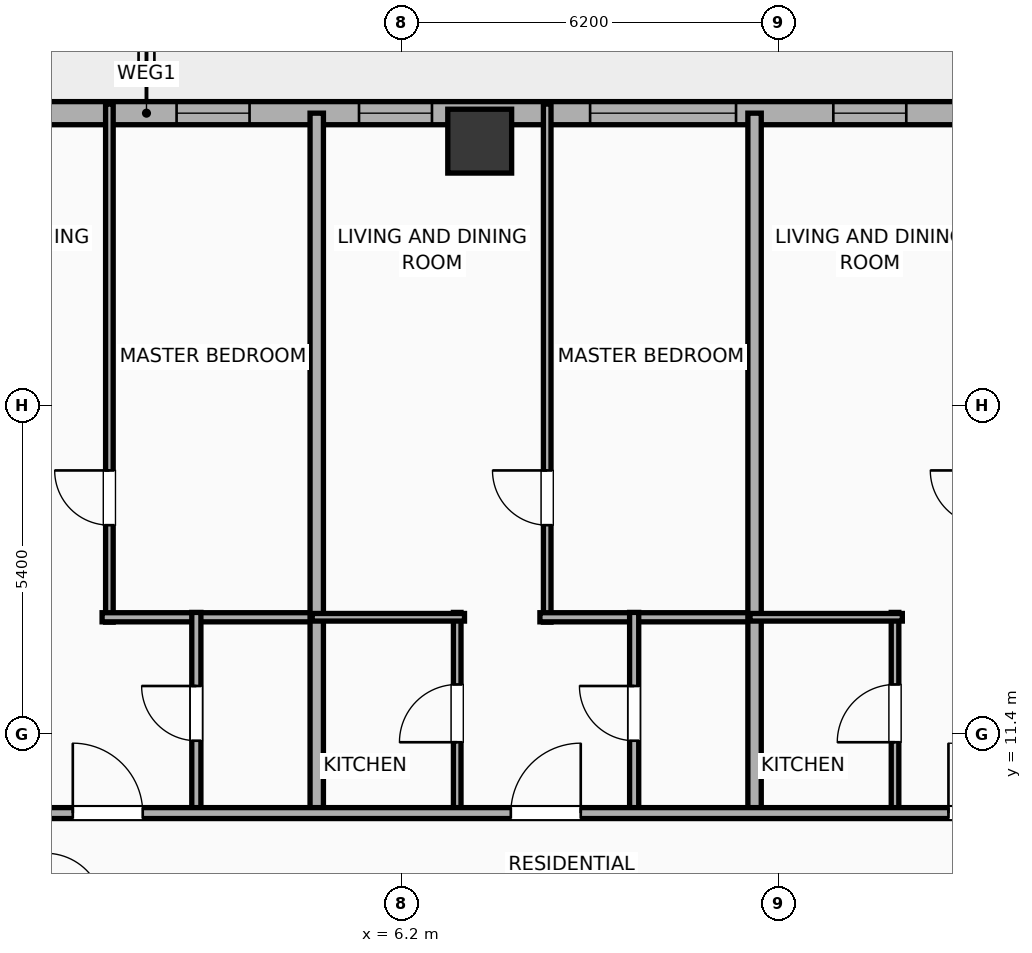
"""IFC4 building model, lengths in metres.
Left out: names, types, materials, properties, quantities, classifications, styles, units other than length and angle.
Written with IfcOpenShell. Run it as: python <this file> out.ifc"""

import sys

from ifc_helpers import new_model, si_unit, direction, frame, frame_2d, origin, origin_2d, place, context, subcontext, project, spatial, rectangle, hollow_rectangle, extrude, element, fill, save


model = new_model("IFC4")
c1 = context("Model", 3, precision=1e-05, world=origin(), true_north=direction((0.0, 1.0)))
c2 = subcontext(c1, "Body", "Model", "MODEL_VIEW")
j1 = project(units=[si_unit("LENGTHUNIT", "METRE"), si_unit("PLANEANGLEUNIT", "RADIAN")], contexts=[c1])
p1 = place(None, origin())
s1 = spatial("IfcSite", under=j1, at=p1, CompositionType="ELEMENT")
p2 = place(p1, origin())
s2 = spatial("IfcBuilding", under=s1, at=p2, CompositionType="ELEMENT")
p3 = place(p2, frame((0.0, 0.0, 113.1)))
s3 = spatial("IfcBuildingStorey", under=s2, at=p3, CompositionType="ELEMENT", Elevation=113.1)
p4 = place(p3, frame((7.48, 21.15, 0.0), z_axis=(0.0, 0.0, 1.0), x_axis=(1.0, 0.0, 0.0)))
e1 = element("IfcColumn", 1, at=p4, inside=s3, PredefinedType="COLUMN", context=c2, shape_type="SweptSolid", body=[
    extrude(hollow_rectangle(XDim=1.05, YDim=1.05, WallThickness=0.036, at=origin_2d()), origin(), (0.0, 0.0, 1.0), 3.9),
])
p5 = place(p3, frame((-25.381, 21.61, 0.0), z_axis=(0.0, 0.0, 1.0), x_axis=(1.0, 0.0, 0.0)))
e2 = element("IfcWall", 2, at=p5, inside=s3, PredefinedType="ELEMENTEDWALL", context=c2, shape_type="SweptSolid", body=[
    extrude(rectangle(XDim=54.763, YDim=0.38, at=frame_2d((27.381, 0.0))), origin(), (0.0, 0.0, 1.0), 3.65),
])
p6 = place(p5, frame((5.645, 0.0, 0.75)))
e3 = element("IfcOpeningElement", 3, at=p6, cuts=e2, PredefinedType="OPENING", context=c2, shape_type="SweptSolid", body=[
    extrude(rectangle(XDim=2.4, YDim=2.1, at=frame_2d((1.2, 1.05))), frame((0.0, 0.2, 0.0), z_axis=(0.0, -1.0, 0.0), x_axis=(1.0, 0.0, 0.0)), (0.0, 0.0, 1.0), 0.4),
])
p7 = place(p5, frame((34.677, 0.0, 0.75)))
e4 = element("IfcOpeningElement", 4, at=p7, cuts=e2, PredefinedType="OPENING", context=c2, shape_type="SweptSolid", body=[
    extrude(rectangle(XDim=2.4, YDim=2.1, at=frame_2d((1.2, 1.05))), frame((0.0, 0.2, 0.0), z_axis=(0.0, -1.0, 0.0), x_axis=(1.0, 0.0, 0.0)), (0.0, 0.0, 1.0), 0.4),
])
p8 = place(p5, frame((45.067, 0.0, 0.75)))
e5 = element("IfcOpeningElement", 5, at=p8, cuts=e2, PredefinedType="OPENING", context=c2, shape_type="SweptSolid", body=[
    extrude(rectangle(XDim=2.4, YDim=2.1, at=frame_2d((1.2, 1.05))), frame((0.0, 0.2, 0.0), z_axis=(0.0, -1.0, 0.0), x_axis=(1.0, 0.0, 0.0)), (0.0, 0.0, 1.0), 0.4),
])
p9 = place(p5, frame((2.938, 0.0, 0.75)))
e6 = element("IfcOpeningElement", 6, at=p9, cuts=e2, PredefinedType="OPENING", context=c2, shape_type="SweptSolid", body=[
    extrude(rectangle(XDim=1.2, YDim=2.05, at=frame_2d((0.6, 1.025))), frame((0.0, 0.2, 0.0), z_axis=(0.0, -1.0, 0.0), x_axis=(1.0, 0.0, 0.0)), (0.0, 0.0, 1.0), 0.4),
])
p10 = place(p5, frame((8.916, 0.0, 0.75)))
e7 = element("IfcOpeningElement", 7, at=p10, cuts=e2, PredefinedType="OPENING", context=c2, shape_type="SweptSolid", body=[
    extrude(rectangle(XDim=1.2, YDim=2.05, at=frame_2d((0.6, 1.025))), frame((0.0, 0.2, 0.0), z_axis=(0.0, -1.0, 0.0), x_axis=(1.0, 0.0, 0.0)), (0.0, 0.0, 1.0), 0.4),
])
p11 = place(p5, frame((13.476, 0.0, 0.75)))
e8 = element("IfcOpeningElement", 8, at=p11, cuts=e2, PredefinedType="OPENING", context=c2, shape_type="SweptSolid", body=[
    extrude(rectangle(XDim=1.2, YDim=2.05, at=frame_2d((0.6, 1.025))), frame((0.0, 0.2, 0.0), z_axis=(0.0, -1.0, 0.0), x_axis=(1.0, 0.0, 0.0)), (0.0, 0.0, 1.0), 0.4),
])
p12 = place(p5, frame((17.076, 0.0, 0.75)))
e9 = element("IfcOpeningElement", 9, at=p12, cuts=e2, PredefinedType="OPENING", context=c2, shape_type="SweptSolid", body=[
    extrude(rectangle(XDim=1.2, YDim=2.05, at=frame_2d((0.6, 1.025))), frame((0.0, 0.2, 0.0), z_axis=(0.0, -1.0, 0.0), x_axis=(1.0, 0.0, 0.0)), (0.0, 0.0, 1.0), 0.4),
])
p13 = place(p5, frame((19.956, 0.0, 0.75)))
e10 = element("IfcOpeningElement", 10, at=p13, cuts=e2, PredefinedType="OPENING", context=c2, shape_type="SweptSolid", body=[
    extrude(rectangle(XDim=1.2, YDim=2.05, at=frame_2d((0.6, 1.025))), frame((0.0, 0.2, 0.0), z_axis=(0.0, -1.0, 0.0), x_axis=(1.0, 0.0, 0.0)), (0.0, 0.0, 1.0), 0.4),
])
p14 = place(p5, frame((24.276, 0.0, 0.75)))
e11 = element("IfcOpeningElement", 11, at=p14, cuts=e2, PredefinedType="OPENING", context=c2, shape_type="SweptSolid", body=[
    extrude(rectangle(XDim=1.2, YDim=2.05, at=frame_2d((0.6, 1.025))), frame((0.0, 0.2, 0.0), z_axis=(0.0, -1.0, 0.0), x_axis=(1.0, 0.0, 0.0)), (0.0, 0.0, 1.0), 0.4),
])
p15 = place(p5, frame((27.876, 0.0, 0.75)))
e12 = element("IfcOpeningElement", 12, at=p15, cuts=e2, PredefinedType="OPENING", context=c2, shape_type="SweptSolid", body=[
    extrude(rectangle(XDim=1.2, YDim=2.05, at=frame_2d((0.6, 1.025))), frame((0.0, 0.2, 0.0), z_axis=(0.0, -1.0, 0.0), x_axis=(1.0, 0.0, 0.0)), (0.0, 0.0, 1.0), 0.4),
])
p16 = place(p5, frame((30.876, 0.0, 0.75)))
e13 = element("IfcOpeningElement", 13, at=p16, cuts=e2, PredefinedType="OPENING", context=c2, shape_type="SweptSolid", body=[
    extrude(rectangle(XDim=1.2, YDim=2.05, at=frame_2d((0.6, 1.025))), frame((0.0, 0.2, 0.0), z_axis=(0.0, -1.0, 0.0), x_axis=(1.0, 0.0, 0.0)), (0.0, 0.0, 1.0), 0.4),
])
p17 = place(p5, frame((38.676, 0.0, 0.75)))
e14 = element("IfcOpeningElement", 14, at=p17, cuts=e2, PredefinedType="OPENING", context=c2, shape_type="SweptSolid", body=[
    extrude(rectangle(XDim=1.2, YDim=2.05, at=frame_2d((0.6, 1.025))), frame((0.0, 0.2, 0.0), z_axis=(0.0, -1.0, 0.0), x_axis=(1.0, 0.0, 0.0)), (0.0, 0.0, 1.0), 0.4),
])
p18 = place(p5, frame((41.796, 0.0, 0.75)))
e15 = element("IfcOpeningElement", 15, at=p18, cuts=e2, PredefinedType="OPENING", context=c2, shape_type="SweptSolid", body=[
    extrude(rectangle(XDim=1.2, YDim=2.05, at=frame_2d((0.6, 1.025))), frame((0.0, 0.2, 0.0), z_axis=(0.0, -1.0, 0.0), x_axis=(1.0, 0.0, 0.0)), (0.0, 0.0, 1.0), 0.4),
])
p19 = place(p5, frame((49.476, 0.0, 0.75)))
e16 = element("IfcOpeningElement", 16, at=p19, cuts=e2, PredefinedType="OPENING", context=c2, shape_type="SweptSolid", body=[
    extrude(rectangle(XDim=1.2, YDim=2.05, at=frame_2d((0.6, 1.025))), frame((0.0, 0.2, 0.0), z_axis=(0.0, -1.0, 0.0), x_axis=(1.0, 0.0, 0.0)), (0.0, 0.0, 1.0), 0.4),
])
p20 = place(p5, frame((52.227, 0.0, 0.75)))
e17 = element("IfcOpeningElement", 17, at=p20, cuts=e2, PredefinedType="OPENING", context=c2, shape_type="SweptSolid", body=[
    extrude(rectangle(XDim=1.2, YDim=2.05, at=frame_2d((0.6, 1.025))), frame((0.0, 0.2, 0.0), z_axis=(0.0, -1.0, 0.0), x_axis=(1.0, 0.0, 0.0)), (0.0, 0.0, 1.0), 0.4),
])
p21 = place(p3, frame((1.39, 13.24, 0.0), z_axis=(0.0, 0.0, 1.0), x_axis=(0.0, 1.0, 0.0)))
e18 = element("IfcWall", 18, at=p21, inside=s3, PredefinedType="PARTITIONING", context=c2, shape_type="SweptSolid", body=[
    extrude(rectangle(XDim=8.52, YDim=0.125, at=frame_2d((4.26, 0.0))), origin(), (0.0, 0.0, 1.0), 3.65),
])
p22 = place(p21, frame((1.595, 0.0, 0.0)))
e19 = element("IfcOpeningElement", 19, at=p22, cuts=e18, PredefinedType="OPENING", context=c2, shape_type="SweptSolid", body=[
    extrude(rectangle(XDim=0.9, YDim=2.05, at=frame_2d((0.45, 1.025))), frame((0.0, 0.073, 0.0), z_axis=(0.0, -1.0, 0.0), x_axis=(1.0, 0.0, 0.0)), (0.0, 0.0, 1.0), 0.145),
])
p23 = place(p3, frame((1.27, 13.32, 0.0), z_axis=(0.0, 0.0, 1.0), x_axis=(1.0, 0.0, 0.0)))
e20 = element("IfcWall", 20, at=p23, inside=s3, PredefinedType="PLUMBINGWALL", context=c2, shape_type="SweptSolid", body=[
    extrude(rectangle(XDim=3.605, YDim=0.15, at=frame_2d((1.802, 0.0))), origin(), (0.0, 0.0, 1.0), 3.65),
])
p24 = place(p3, frame((2.82, 10.08, 0.0), z_axis=(0.0, 0.0, 1.0), x_axis=(0.0, 1.0, 0.0)))
e21 = element("IfcWall", 21, at=p24, inside=s3, PredefinedType="PLUMBINGWALL", context=c2, shape_type="SweptSolid", body=[
    extrude(rectangle(XDim=3.32, YDim=0.15, at=frame_2d((1.66, 0.0))), origin(), (0.0, 0.0, 1.0), 3.65),
])
p25 = place(p24, frame((1.21, 0.0, 0.0)))
e22 = element("IfcOpeningElement", 22, at=p25, cuts=e21, PredefinedType="OPENING", context=c2, shape_type="SweptSolid", body=[
    extrude(rectangle(XDim=0.9, YDim=2.05, at=frame_2d((0.45, 1.025))), frame((0.0, 0.085, 0.0), z_axis=(0.0, -1.0, 0.0), x_axis=(1.0, 0.0, 0.0)), (0.0, 0.0, 1.0), 0.17),
])
p26 = place(p3, frame((4.8, 10.02, 0.0), z_axis=(0.0, 0.0, 1.0), x_axis=(0.0, 1.0, 0.0)))
e23 = element("IfcWall", 23, at=p26, inside=s3, PredefinedType="PARTITIONING", context=c2, shape_type="SweptSolid", body=[
    extrude(rectangle(XDim=11.59, YDim=0.22, at=frame_2d((5.795, 0.0))), origin(), (0.0, 0.0, 1.0), 3.04),
])
p27 = place(p3, frame((8.59, 13.24, 0.0), z_axis=(0.0, 0.0, 1.0), x_axis=(0.0, 1.0, 0.0)))
e24 = element("IfcWall", 24, at=p27, inside=s3, PredefinedType="PARTITIONING", context=c2, shape_type="SweptSolid", body=[
    extrude(rectangle(XDim=8.52, YDim=0.125, at=frame_2d((4.26, 0.0))), origin(), (0.0, 0.0, 1.0), 3.65),
])
p28 = place(p27, frame((1.595, 0.0, 0.0)))
e25 = element("IfcOpeningElement", 25, at=p28, cuts=e24, PredefinedType="OPENING", context=c2, shape_type="SweptSolid", body=[
    extrude(rectangle(XDim=0.9, YDim=2.05, at=frame_2d((0.45, 1.025))), frame((0.0, 0.073, 0.0), z_axis=(0.0, -1.0, 0.0), x_axis=(1.0, 0.0, 0.0)), (0.0, 0.0, 1.0), 0.145),
])
p29 = place(p3, frame((8.47, 13.32, 0.0), z_axis=(0.0, 0.0, 1.0), x_axis=(1.0, 0.0, 0.0)))
e26 = element("IfcWall", 26, at=p29, inside=s3, PredefinedType="PLUMBINGWALL", context=c2, shape_type="SweptSolid", body=[
    extrude(rectangle(XDim=3.605, YDim=0.15, at=frame_2d((1.802, 0.0))), origin(), (0.0, 0.0, 1.0), 3.65),
])
p30 = place(p3, frame((7.11, 10.08, 0.0), z_axis=(0.0, 0.0, 1.0), x_axis=(0.0, 1.0, 0.0)))
e27 = element("IfcWall", 27, at=p30, inside=s3, PredefinedType="PARTITIONING", context=c2, shape_type="SweptSolid", body=[
    extrude(rectangle(XDim=3.32, YDim=0.125, at=frame_2d((1.66, 0.0))), origin(), (0.0, 0.0, 1.0), 3.65),
])
p31 = place(p30, frame((1.185, 0.0, 0.0)))
e28 = element("IfcOpeningElement", 28, at=p31, cuts=e27, PredefinedType="OPENING", context=c2, shape_type="SweptSolid", body=[
    extrude(rectangle(XDim=0.95, YDim=2.05, at=frame_2d((0.475, 1.025))), frame((0.0, 0.073, 0.0), z_axis=(0.0, -1.0, 0.0), x_axis=(1.0, 0.0, 0.0)), (0.0, 0.0, 1.0), 0.145),
])
p32 = place(p3, frame((4.725, 13.32, 0.0), z_axis=(0.0, 0.0, 1.0), x_axis=(1.0, 0.0, 0.0)))
e29 = element("IfcWall", 29, at=p32, inside=s3, PredefinedType="PARTITIONING", context=c2, shape_type="SweptSolid", body=[
    extrude(rectangle(XDim=2.505, YDim=0.125, at=frame_2d((1.252, 0.0))), origin(), (0.0, 0.0, 1.0), 3.65),
])
p33 = place(p3, frame((10.02, 10.08, 0.0), z_axis=(0.0, 0.0, 1.0), x_axis=(0.0, 1.0, 0.0)))
e30 = element("IfcWall", 30, at=p33, inside=s3, PredefinedType="PLUMBINGWALL", context=c2, shape_type="SweptSolid", body=[
    extrude(rectangle(XDim=3.32, YDim=0.15, at=frame_2d((1.66, 0.0))), origin(), (0.0, 0.0, 1.0), 3.65),
])
p34 = place(p33, frame((1.21, 0.0, 0.0)))
e31 = element("IfcOpeningElement", 31, at=p34, cuts=e30, PredefinedType="OPENING", context=c2, shape_type="SweptSolid", body=[
    extrude(rectangle(XDim=0.9, YDim=2.05, at=frame_2d((0.45, 1.025))), frame((0.0, 0.085, 0.0), z_axis=(0.0, -1.0, 0.0), x_axis=(1.0, 0.0, 0.0)), (0.0, 0.0, 1.0), 0.17),
])
p35 = place(p3, frame((12.0, 10.02, 0.0), z_axis=(0.0, 0.0, 1.0), x_axis=(0.0, 1.0, 0.0)))
e32 = element("IfcWall", 32, at=p35, inside=s3, PredefinedType="PARTITIONING", context=c2, shape_type="SweptSolid", body=[
    extrude(rectangle(XDim=11.59, YDim=0.22, at=frame_2d((5.795, 0.0))), origin(), (0.0, 0.0, 1.0), 3.65),
])
p36 = place(p3, frame((14.31, 10.08, 0.0), z_axis=(0.0, 0.0, 1.0), x_axis=(0.0, 1.0, 0.0)))
e33 = element("IfcWall", 33, at=p36, inside=s3, PredefinedType="PARTITIONING", context=c2, shape_type="SweptSolid", body=[
    extrude(rectangle(XDim=3.32, YDim=0.125, at=frame_2d((1.66, 0.0))), origin(), (0.0, 0.0, 1.0), 3.65),
])
p37 = place(p36, frame((1.185, 0.0, 0.0)))
e34 = element("IfcOpeningElement", 34, at=p37, cuts=e33, PredefinedType="OPENING", context=c2, shape_type="SweptSolid", body=[
    extrude(rectangle(XDim=0.95, YDim=2.05, at=frame_2d((0.475, 1.025))), frame((0.0, 0.073, 0.0), z_axis=(0.0, -1.0, 0.0), x_axis=(1.0, 0.0, 0.0)), (0.0, 0.0, 1.0), 0.145),
])
p38 = place(p3, frame((11.925, 13.32, 0.0), z_axis=(0.0, 0.0, 1.0), x_axis=(1.0, 0.0, 0.0)))
e35 = element("IfcWall", 35, at=p38, inside=s3, PredefinedType="PARTITIONING", context=c2, shape_type="SweptSolid", body=[
    extrude(rectangle(XDim=2.505, YDim=0.125, at=frame_2d((1.252, 0.0))), origin(), (0.0, 0.0, 1.0), 3.65),
])
p39 = place(p3, frame((-29.21, 10.1, 0.0), z_axis=(0.0, 0.0, 1.0), x_axis=(1.0, 0.0, 0.0)))
e36 = element("IfcWall", 36, at=p39, inside=s3, PredefinedType="PARTITIONING", context=c2, shape_type="SweptSolid", body=[
    extrude(rectangle(XDim=62.42, YDim=0.18, at=frame_2d((31.21, 0.0))), origin(), (0.0, 0.0, 1.0), 3.65),
])
p40 = place(p39, frame((2.74, 0.0, 0.0)))
e37 = element("IfcOpeningElement", 37, at=p40, cuts=e36, PredefinedType="OPENING", context=c2, shape_type="SweptSolid", body=[
    extrude(rectangle(XDim=0.9, YDim=2.05, at=frame_2d((0.45, 1.025))), frame((0.0, 0.1, 0.0), z_axis=(0.0, -1.0, 0.0), x_axis=(1.0, 0.0, 0.0)), (0.0, 0.0, 1.0), 0.2),
])
p41 = place(p39, frame((9.868, 0.0, 0.0)))
e38 = element("IfcOpeningElement", 38, at=p41, cuts=e36, PredefinedType="OPENING", context=c2, shape_type="SweptSolid", body=[
    extrude(rectangle(XDim=1.15, YDim=2.05, at=frame_2d((0.575, 1.025))), frame((0.0, 0.1, 0.0), z_axis=(0.0, -1.0, 0.0), x_axis=(1.0, 0.0, 0.0)), (0.0, 0.0, 1.0), 0.2),
])
p42 = place(p39, frame((15.598, 0.0, 0.0)))
e39 = element("IfcOpeningElement", 39, at=p42, cuts=e36, PredefinedType="OPENING", context=c2, shape_type="SweptSolid", body=[
    extrude(rectangle(XDim=1.15, YDim=2.05, at=frame_2d((0.575, 1.025))), frame((0.0, 0.1, 0.0), z_axis=(0.0, -1.0, 0.0), x_axis=(1.0, 0.0, 0.0)), (0.0, 0.0, 1.0), 0.2),
])
p43 = place(p39, frame((22.801, 0.0, 0.0)))
e40 = element("IfcOpeningElement", 40, at=p43, cuts=e36, PredefinedType="OPENING", context=c2, shape_type="SweptSolid", body=[
    extrude(rectangle(XDim=1.15, YDim=2.05, at=frame_2d((0.575, 1.025))), frame((0.0, 0.1, 0.0), z_axis=(0.0, -1.0, 0.0), x_axis=(1.0, 0.0, 0.0)), (0.0, 0.0, 1.0), 0.2),
])
p44 = place(p39, frame((29.998, 0.0, 0.0)))
e41 = element("IfcOpeningElement", 41, at=p44, cuts=e36, PredefinedType="OPENING", context=c2, shape_type="SweptSolid", body=[
    extrude(rectangle(XDim=1.15, YDim=2.05, at=frame_2d((0.575, 1.025))), frame((0.0, 0.1, 0.0), z_axis=(0.0, -1.0, 0.0), x_axis=(1.0, 0.0, 0.0)), (0.0, 0.0, 1.0), 0.2),
])
p45 = place(p39, frame((37.202, 0.0, 0.0)))
e42 = element("IfcOpeningElement", 42, at=p45, cuts=e36, PredefinedType="OPENING", context=c2, shape_type="SweptSolid", body=[
    extrude(rectangle(XDim=1.15, YDim=2.05, at=frame_2d((0.575, 1.025))), frame((0.0, 0.1, 0.0), z_axis=(0.0, -1.0, 0.0), x_axis=(1.0, 0.0, 0.0)), (0.0, 0.0, 1.0), 0.2),
])
p46 = place(p39, frame((44.399, 0.0, 0.0)))
e43 = element("IfcOpeningElement", 43, at=p46, cuts=e36, PredefinedType="OPENING", context=c2, shape_type="SweptSolid", body=[
    extrude(rectangle(XDim=1.15, YDim=2.05, at=frame_2d((0.575, 1.025))), frame((0.0, 0.1, 0.0), z_axis=(0.0, -1.0, 0.0), x_axis=(1.0, 0.0, 0.0)), (0.0, 0.0, 1.0), 0.2),
])
p47 = place(p39, frame((51.602, 0.0, 0.0)))
e44 = element("IfcOpeningElement", 44, at=p47, cuts=e36, PredefinedType="OPENING", context=c2, shape_type="SweptSolid", body=[
    extrude(rectangle(XDim=1.15, YDim=2.05, at=frame_2d((0.575, 1.025))), frame((0.0, 0.1, 0.0), z_axis=(0.0, -1.0, 0.0), x_axis=(1.0, 0.0, 0.0)), (0.0, 0.0, 1.0), 0.2),
])
p48 = place(p39, frame((58.762, 0.0, 0.0)))
e45 = element("IfcOpeningElement", 45, at=p48, cuts=e36, PredefinedType="OPENING", context=c2, shape_type="SweptSolid", body=[
    extrude(rectangle(XDim=0.9, YDim=2.05, at=frame_2d((0.45, 1.025))), frame((0.0, 0.1, 0.0), z_axis=(0.0, -1.0, 0.0), x_axis=(1.0, 0.0, 0.0)), (0.0, 0.0, 1.0), 0.2),
])
p49 = place(p7, origin())
e46 = element("IfcWindow", 46, at=p49, inside=s3, PartitioningType="SINGLE_PANEL", PredefinedType="WINDOW", context=c2, shape_type="SweptSolid", body=[
    extrude(rectangle(XDim=2.4, YDim=2.1, at=frame_2d((1.2, 1.05))), frame((0.0, 0.03, 0.0), z_axis=(0.0, -1.0, 0.0), x_axis=(1.0, 0.0, 0.0)), (0.0, 0.0, 1.0), 0.06),
])
fill(e4, e46)
p50 = place(p15, origin())
e47 = element("IfcWindow", 47, at=p50, inside=s3, PartitioningType="SINGLE_PANEL", PredefinedType="WINDOW", context=c2, shape_type="SweptSolid", body=[
    extrude(rectangle(XDim=1.2, YDim=2.05, at=frame_2d((0.6, 1.025))), frame((0.0, 0.03, 0.0), z_axis=(0.0, -1.0, 0.0), x_axis=(1.0, 0.0, 0.0)), (0.0, 0.0, 1.0), 0.06),
])
fill(e12, e47)
p51 = place(p16, origin())
e48 = element("IfcWindow", 48, at=p51, inside=s3, PartitioningType="SINGLE_PANEL", PredefinedType="WINDOW", context=c2, shape_type="SweptSolid", body=[
    extrude(rectangle(XDim=1.2, YDim=2.05, at=frame_2d((0.6, 1.025))), frame((0.0, 0.03, 0.0), z_axis=(0.0, -1.0, 0.0), x_axis=(1.0, 0.0, 0.0)), (0.0, 0.0, 1.0), 0.06),
])
fill(e13, e48)
p52 = place(p17, origin())
e49 = element("IfcWindow", 49, at=p52, inside=s3, PartitioningType="SINGLE_PANEL", PredefinedType="WINDOW", context=c2, shape_type="SweptSolid", body=[
    extrude(rectangle(XDim=1.2, YDim=2.05, at=frame_2d((0.6, 1.025))), frame((0.0, 0.03, 0.0), z_axis=(0.0, -1.0, 0.0), x_axis=(1.0, 0.0, 0.0)), (0.0, 0.0, 1.0), 0.06),
])
fill(e14, e49)
p53 = place(p22, origin())
e50 = element("IfcDoor", 50, at=p53, inside=s3, OperationType="SINGLE_SWING_RIGHT", PredefinedType="DOOR", context=c2, shape_type="SweptSolid", body=[
    extrude(rectangle(XDim=0.9, YDim=2.05, at=frame_2d((0.45, 1.025))), frame((0.0, 0.025, 0.0), z_axis=(0.0, -1.0, 0.0), x_axis=(1.0, 0.0, 0.0)), (0.0, 0.0, 1.0), 0.05),
])
fill(e19, e50)
p54 = place(p25, origin())
e51 = element("IfcDoor", 51, at=p54, inside=s3, OperationType="SINGLE_SWING_RIGHT", PredefinedType="DOOR", context=c2, shape_type="SweptSolid", body=[
    extrude(rectangle(XDim=0.9, YDim=2.05, at=frame_2d((0.45, 1.025))), frame((0.0, 0.025, 0.0), z_axis=(0.0, -1.0, 0.0), x_axis=(1.0, 0.0, 0.0)), (0.0, 0.0, 1.0), 0.05),
])
fill(e22, e51)
p55 = place(p28, origin())
e52 = element("IfcDoor", 52, at=p55, inside=s3, OperationType="SINGLE_SWING_RIGHT", PredefinedType="DOOR", context=c2, shape_type="SweptSolid", body=[
    extrude(rectangle(XDim=0.9, YDim=2.05, at=frame_2d((0.45, 1.025))), frame((0.0, 0.025, 0.0), z_axis=(0.0, -1.0, 0.0), x_axis=(1.0, 0.0, 0.0)), (0.0, 0.0, 1.0), 0.05),
])
fill(e25, e52)
p56 = place(p31, origin())
e53 = element("IfcDoor", 53, at=p56, inside=s3, OperationType="SINGLE_SWING_LEFT", PredefinedType="DOOR", context=c2, shape_type="SweptSolid", body=[
    extrude(rectangle(XDim=0.95, YDim=2.05, at=frame_2d((0.475, 1.025))), frame((0.0, 0.025, 0.0), z_axis=(0.0, -1.0, 0.0), x_axis=(1.0, 0.0, 0.0)), (0.0, 0.0, 1.0), 0.05),
])
fill(e28, e53)
p57 = place(p34, origin())
e54 = element("IfcDoor", 54, at=p57, inside=s3, OperationType="SINGLE_SWING_RIGHT", PredefinedType="DOOR", context=c2, shape_type="SweptSolid", body=[
    extrude(rectangle(XDim=0.9, YDim=2.05, at=frame_2d((0.45, 1.025))), frame((0.0, 0.025, 0.0), z_axis=(0.0, -1.0, 0.0), x_axis=(1.0, 0.0, 0.0)), (0.0, 0.0, 1.0), 0.05),
])
fill(e31, e54)
p58 = place(p37, origin())
e55 = element("IfcDoor", 55, at=p58, inside=s3, OperationType="SINGLE_SWING_LEFT", PredefinedType="DOOR", context=c2, shape_type="SweptSolid", body=[
    extrude(rectangle(XDim=0.95, YDim=2.05, at=frame_2d((0.475, 1.025))), frame((0.0, 0.025, 0.0), z_axis=(0.0, -1.0, 0.0), x_axis=(1.0, 0.0, 0.0)), (0.0, 0.0, 1.0), 0.05),
])
fill(e34, e55)
p59 = place(p44, origin())
e56 = element("IfcDoor", 56, at=p59, inside=s3, OperationType="SINGLE_SWING_LEFT", PredefinedType="DOOR", context=c2, shape_type="SweptSolid", body=[
    extrude(rectangle(XDim=1.15, YDim=2.05, at=frame_2d((0.575, 1.025))), frame((0.0, 0.025, 0.0), z_axis=(0.0, -1.0, 0.0), x_axis=(1.0, 0.0, 0.0)), (0.0, 0.0, 1.0), 0.05),
])
fill(e41, e56)
p60 = place(p45, origin())
e57 = element("IfcDoor", 57, at=p60, inside=s3, OperationType="SINGLE_SWING_RIGHT", PredefinedType="DOOR", context=c2, shape_type="SweptSolid", body=[
    extrude(rectangle(XDim=1.15, YDim=2.05, at=frame_2d((0.575, 1.025))), frame((0.0, 0.025, 0.0), z_axis=(0.0, -1.0, 0.0), x_axis=(1.0, 0.0, 0.0)), (0.0, 0.0, 1.0), 0.05),
])
fill(e42, e57)
p61 = place(p46, origin())
e58 = element("IfcDoor", 58, at=p61, inside=s3, OperationType="SINGLE_SWING_LEFT", PredefinedType="DOOR", context=c2, shape_type="SweptSolid", body=[
    extrude(rectangle(XDim=1.15, YDim=2.05, at=frame_2d((0.575, 1.025))), frame((0.0, 0.025, 0.0), z_axis=(0.0, -1.0, 0.0), x_axis=(1.0, 0.0, 0.0)), (0.0, 0.0, 1.0), 0.05),
])
fill(e43, e58)
save(model, sys.argv[1])
